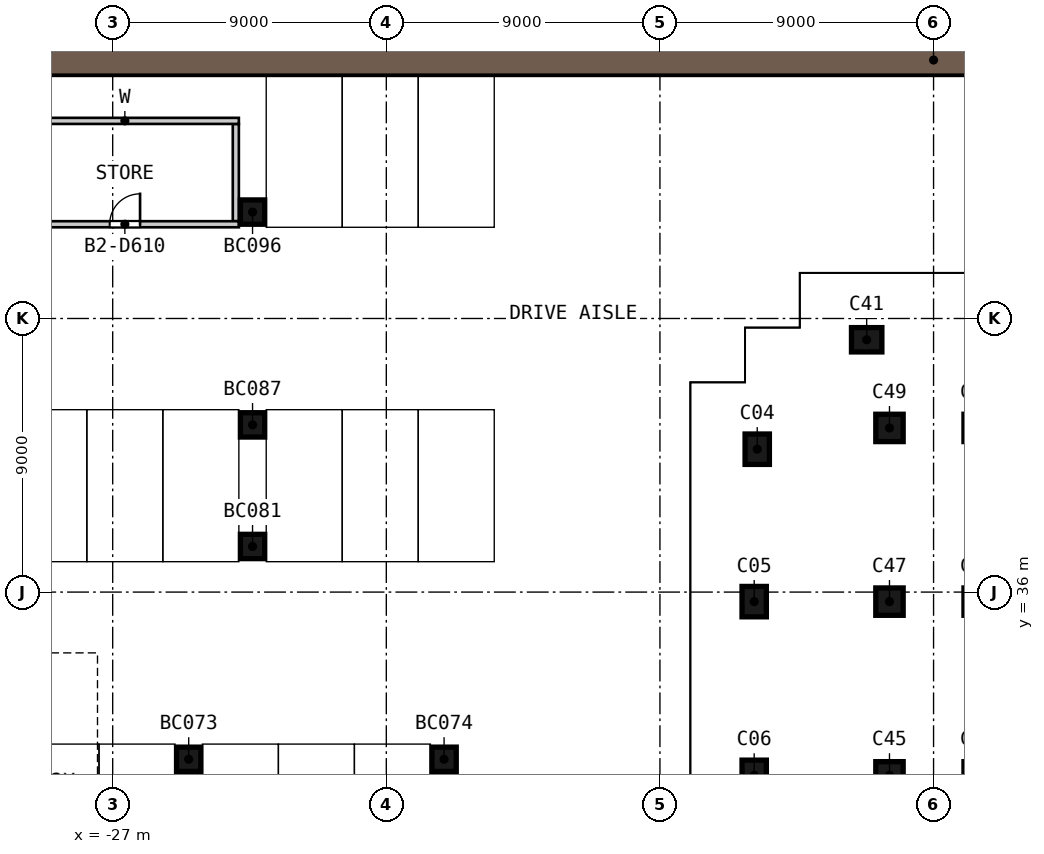
"""IFC4 building model, lengths in metres.
Left out: names, types, materials, properties, quantities, classifications, styles, units other than length and angle.
Written with IfcOpenShell. Run it as: python <this file> out.ifc"""

import sys

from ifc_helpers import new_model, si_unit, direction, frame, frame_2d, origin, origin_2d, place, context, subcontext, project, spatial, polyline, rectangle, outline, extrude, element, fill, save


model = new_model("IFC4")
c1 = context("Model", 3, precision=1e-05, world=origin(), true_north=direction((0.0, 1.0)))
c2 = subcontext(c1, "Body", "Model", "MODEL_VIEW")
j1 = project(units=[si_unit("LENGTHUNIT", "METRE"), si_unit("PLANEANGLEUNIT", "RADIAN")], contexts=[c1])
p1 = place(None, origin())
s1 = spatial("IfcSite", under=j1, at=p1, CompositionType="ELEMENT")
p2 = place(p1, origin())
s2 = spatial("IfcBuilding", under=s1, at=p2, CompositionType="ELEMENT")
p3 = place(p2, frame((0.0, 0.0, -7.8)))
s3 = spatial("IfcBuildingStorey", under=s2, at=p3, CompositionType="ELEMENT", Elevation=-7.8)
for number, where, z_axis, x_axis in (
    (1, (-5.8, 40.7, 0.0), (0.0, 0.0, 1.0), (0.0, -1.0, 0.0)),
    (2, (-5.9, 35.686, 0.0), (0.0, 0.0, 1.0), (0.0, -1.0, 0.0)),
    (3, (-5.9, 29.972, 0.0), (0.0, 0.0, 1.0), (0.0, -1.0, 0.0)),
    (4, (-2.2, 44.3, 0.0), (0.0, 0.0, 1.0), (-1.0, 0.0, 0.0)),
):
    element("IfcColumn", number, at=place(p3, frame(where, z_axis=z_axis, x_axis=x_axis)), inside=s3, PredefinedType="COLUMN", context=c2, shape_type="SweptSolid", body=[
        extrude(rectangle(XDim=1.0, YDim=0.8, at=origin_2d()), origin(), (0.0, 0.0, 1.0), 3.45),
    ])
for number, where, z_axis, x_axis in (
    (5, (-1.45, 29.972, 0.0), (0.0, 0.0, 1.0), (0.0, 1.0, 0.0)),
    (6, (-1.45, 35.686, 0.0), (0.0, 0.0, 1.0), (0.0, 1.0, 0.0)),
    (7, (-1.45, 41.4, 0.0), (0.0, 0.0, 1.0), (0.0, 1.0, 0.0)),
):
    element("IfcColumn", number, at=place(p3, frame(where, z_axis=z_axis, x_axis=x_axis)), inside=s3, PredefinedType="COLUMN", context=c2, shape_type="SweptSolid", body=[
        extrude(rectangle(XDim=0.9, YDim=0.9, at=origin_2d()), origin(), (0.0, 0.0, 1.0), 3.45),
    ])
p4 = place(p3, origin())
e8 = element("IfcWall", 8, at=p4, inside=s3, PredefinedType="SOLIDWALL", context=c2, shape_type="SweptSolid", body=[
    extrude(outline(polyline([(54.0, 54.0), (-54.0, 54.0), (-53.0, 53.0), (53.0, 53.0), (54.0, 54.0)])), origin(), (0.0, 0.0, 1.0), 3.9),
])
for number, where, z_axis, x_axis in (
    (9, (-24.5, 30.5, 0.0), (0.0, 0.0, 1.0), (1.0, 0.0, 0.0)),
    (10, (-16.1, 30.5, 0.0), (0.0, 0.0, 1.0), (1.0, 0.0, 0.0)),
    (11, (-22.4, 37.5, 0.0), (0.0, 0.0, 1.0), (1.0, 0.0, 0.0)),
    (12, (-22.4, 41.5, 0.0), (0.0, 0.0, 1.0), (1.0, 0.0, 0.0)),
    (13, (-22.4, 48.5, 0.0), (0.0, 0.0, 1.0), (1.0, 0.0, 0.0)),
):
    element("IfcColumn", number, at=place(p3, frame(where, z_axis=z_axis, x_axis=x_axis)), inside=s3, PredefinedType="COLUMN", context=c2, shape_type="SweptSolid", body=[
        extrude(rectangle(XDim=0.8, YDim=0.8, at=origin_2d()), origin(), (0.0, 0.0, 1.0), 3.9),
    ])
p5 = place(p3, frame((-30.35, 48.1, 0.0), z_axis=(0.0, 0.0, 1.0), x_axis=(1.0, 0.0, 0.0)))
e14 = element("IfcWall", 14, at=p5, inside=s3, PredefinedType="PARTITIONING", context=c2, shape_type="SweptSolid", body=[
    extrude(rectangle(XDim=7.5, YDim=0.2, at=frame_2d((3.75, 0.0))), origin(), (0.0, 0.0, 1.0), 3.45),
])
p6 = place(p5, frame((3.25, 0.0, 0.0)))
e15 = element("IfcOpeningElement", 15, at=p6, cuts=e14, PredefinedType="OPENING", context=c2, shape_type="SweptSolid", body=[
    extrude(rectangle(XDim=1.0, YDim=2.1, at=frame_2d((0.5, 1.05))), frame((0.0, 0.11, 0.0), z_axis=(0.0, -1.0, 0.0), x_axis=(1.0, 0.0, 0.0)), (0.0, 0.0, 1.0), 0.22),
])
p7 = place(p3, frame((-30.35, 51.5, 0.0), z_axis=(0.0, 0.0, 1.0), x_axis=(1.0, 0.0, 0.0)))
e16 = element("IfcWall", 16, at=p7, inside=s3, PredefinedType="PARTITIONING", context=c2, shape_type="SweptSolid", body=[
    extrude(rectangle(XDim=7.5, YDim=0.2, at=frame_2d((3.75, 0.0))), origin(), (0.0, 0.0, 1.0), 3.45),
])
p8 = place(p3, frame((-22.95, 48.2, 0.0), z_axis=(0.0, 0.0, 1.0), x_axis=(0.0, 1.0, 0.0)))
e17 = element("IfcWall", 17, at=p8, inside=s3, PredefinedType="PARTITIONING", context=c2, shape_type="SweptSolid", body=[
    extrude(rectangle(XDim=3.2, YDim=0.2, at=frame_2d((1.6, 0.0))), origin(), (0.0, 0.0, 1.0), 3.45),
])
p9 = place(p6, origin())
e18 = element("IfcDoor", 18, at=p9, inside=s3, OperationType="SINGLE_SWING_RIGHT", PredefinedType="DOOR", context=c2, shape_type="SweptSolid", body=[
    extrude(rectangle(XDim=1.0, YDim=2.1, at=frame_2d((0.5, 1.05))), frame((0.0, 0.025, 0.0), z_axis=(0.0, -1.0, 0.0), x_axis=(1.0, 0.0, 0.0)), (0.0, 0.0, 1.0), 0.05),
])
fill(e15, e18)
save(model, sys.argv[1])
